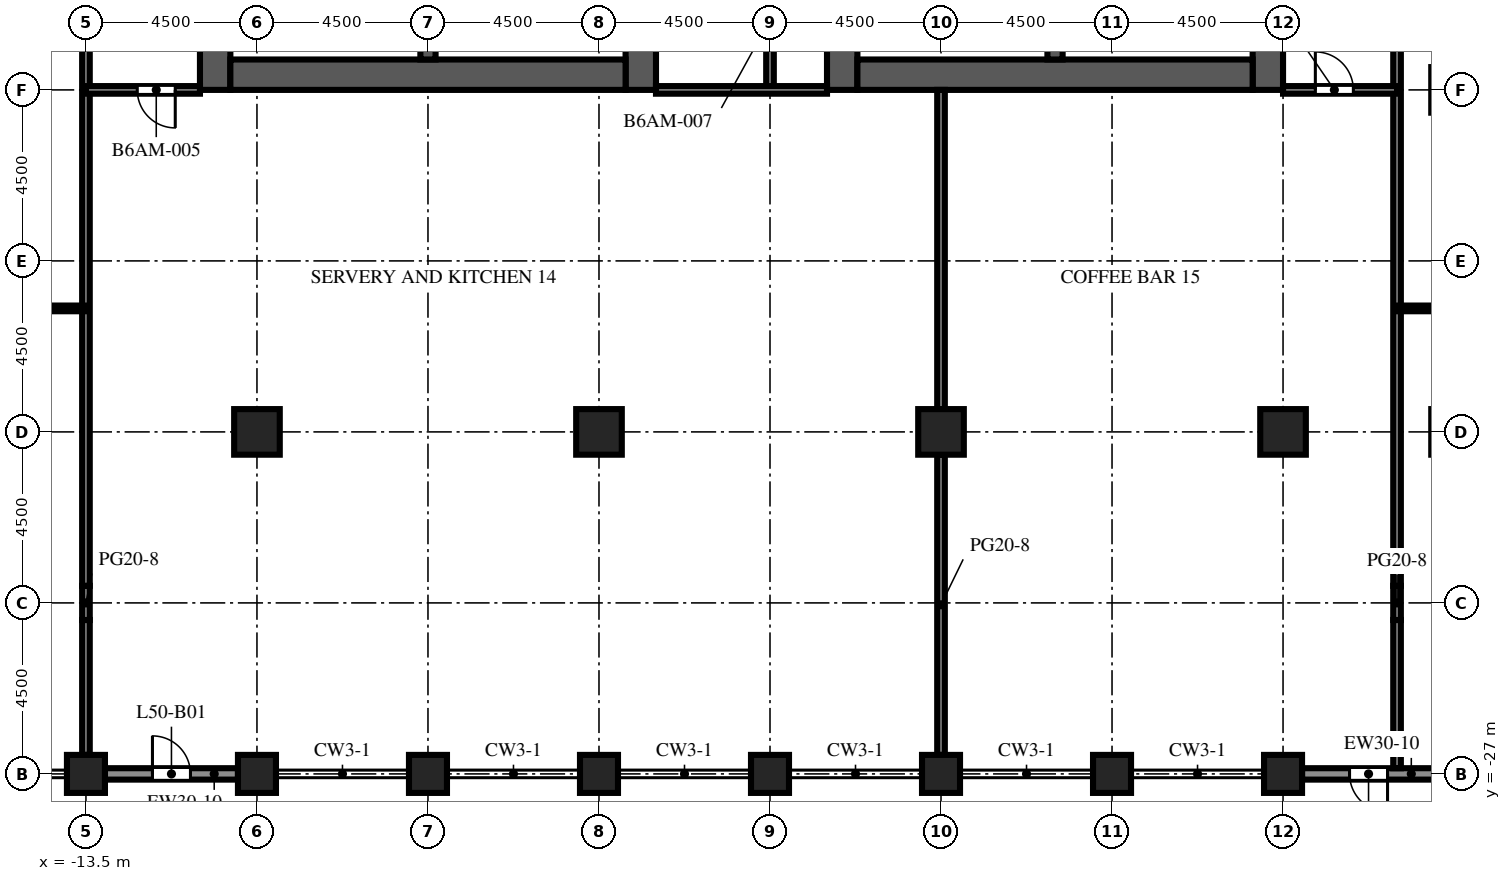
"""IFC4 building model, lengths in metres.
Left out: names, types, materials, properties, quantities, classifications, styles, units other than length and angle.
Written with IfcOpenShell. Run it as: python <this file> out.ifc"""

import sys

from ifc_helpers import new_model, si_unit, direction, frame, frame_2d, origin, origin_2d, place, context, subcontext, project, spatial, rectangle, extrude, element, fill, save


model = new_model("IFC4")
c1 = context("Model", 3, precision=1e-05, world=origin(), true_north=direction((0.0, 1.0)))
c2 = subcontext(c1, "Body", "Model", "MODEL_VIEW")
j1 = project(units=[si_unit("LENGTHUNIT", "METRE"), si_unit("PLANEANGLEUNIT", "RADIAN")], contexts=[c1])
p1 = place(None, origin())
s1 = spatial("IfcSite", under=j1, at=p1, CompositionType="ELEMENT")
p2 = place(p1, origin())
s2 = spatial("IfcBuilding", under=s1, at=p2, CompositionType="ELEMENT")
p3 = place(p2, frame((0.0, 0.0, 220.2)))
s3 = spatial("IfcBuildingStorey", under=s2, at=p3, CompositionType="ELEMENT", Elevation=220.2)
p4 = place(p3, frame((-13.5, -27.0, 0.0), z_axis=(0.0, 0.0, 1.0), x_axis=(1.0, 0.0, 0.0)))
e1 = element("IfcColumn", 1, at=p4, inside=s3, PredefinedType="COLUMN", context=c2, shape_type="SweptSolid", body=[
    extrude(rectangle(XDim=1.0, YDim=1.0, at=origin_2d()), origin(), (0.0, 0.0, 1.0), 6.0),
])
p5 = place(p3, frame((-9.0, -27.0, 0.0), z_axis=(0.0, 0.0, 1.0), x_axis=(1.0, 0.0, 0.0)))
e2 = element("IfcColumn", 2, at=p5, inside=s3, PredefinedType="COLUMN", context=c2, shape_type="SweptSolid", body=[
    extrude(rectangle(XDim=1.0, YDim=1.0, at=origin_2d()), origin(), (0.0, 0.0, 1.0), 3.6),
])
p6 = place(p3, frame((-4.5, -27.0, 0.0), z_axis=(0.0, 0.0, 1.0), x_axis=(1.0, 0.0, 0.0)))
e3 = element("IfcColumn", 3, at=p6, inside=s3, PredefinedType="COLUMN", context=c2, shape_type="SweptSolid", body=[
    extrude(rectangle(XDim=1.0, YDim=1.0, at=origin_2d()), origin(), (0.0, 0.0, 1.0), 6.0),
])
p7 = place(p3, frame((0.0, -27.0, 0.0), z_axis=(0.0, 0.0, 1.0), x_axis=(1.0, 0.0, 0.0)))
e4 = element("IfcColumn", 4, at=p7, inside=s3, PredefinedType="COLUMN", context=c2, shape_type="SweptSolid", body=[
    extrude(rectangle(XDim=1.0, YDim=1.0, at=origin_2d()), origin(), (0.0, 0.0, 1.0), 3.6),
])
p8 = place(p3, frame((4.5, -27.0, 0.0), z_axis=(0.0, 0.0, 1.0), x_axis=(1.0, 0.0, 0.0)))
e5 = element("IfcColumn", 5, at=p8, inside=s3, PredefinedType="COLUMN", context=c2, shape_type="SweptSolid", body=[
    extrude(rectangle(XDim=1.0, YDim=1.0, at=origin_2d()), origin(), (0.0, 0.0, 1.0), 6.0),
])
p9 = place(p3, frame((9.0, -27.0, 0.0), z_axis=(0.0, 0.0, 1.0), x_axis=(1.0, 0.0, 0.0)))
e6 = element("IfcColumn", 6, at=p9, inside=s3, PredefinedType="COLUMN", context=c2, shape_type="SweptSolid", body=[
    extrude(rectangle(XDim=1.0, YDim=1.0, at=origin_2d()), origin(), (0.0, 0.0, 1.0), 3.6),
])
p10 = place(p3, frame((13.5, -27.0, 0.0), z_axis=(0.0, 0.0, 1.0), x_axis=(1.0, 0.0, 0.0)))
e7 = element("IfcColumn", 7, at=p10, inside=s3, PredefinedType="COLUMN", context=c2, shape_type="SweptSolid", body=[
    extrude(rectangle(XDim=1.0, YDim=1.0, at=origin_2d()), origin(), (0.0, 0.0, 1.0), 6.0),
])
p11 = place(p3, frame((18.0, -27.0, 0.0), z_axis=(0.0, 0.0, 1.0), x_axis=(1.0, 0.0, 0.0)))
e8 = element("IfcColumn", 8, at=p11, inside=s3, PredefinedType="COLUMN", context=c2, shape_type="SweptSolid", body=[
    extrude(rectangle(XDim=1.0, YDim=1.0, at=origin_2d()), origin(), (0.0, 0.0, 1.0), 3.6),
])
for number, where, z_axis, x_axis in (
    (9, (-9.0, -18.0, 0.0), (0.0, 0.0, 1.0), (1.0, 0.0, 0.0)),
    (10, (0.0, -18.0, 0.0), (0.0, 0.0, 1.0), (1.0, 0.0, 0.0)),
    (11, (9.0, -18.0, 0.0), (0.0, 0.0, 1.0), (1.0, 0.0, 0.0)),
    (12, (18.0, -18.0, 0.0), (0.0, 0.0, 1.0), (1.0, 0.0, 0.0)),
):
    element("IfcColumn", number, at=place(p3, frame(where, z_axis=z_axis, x_axis=x_axis)), inside=s3, PredefinedType="COLUMN", context=c2, shape_type="SweptSolid", body=[
        extrude(rectangle(XDim=1.2, YDim=1.2, at=origin_2d()), origin(), (0.0, 0.0, 1.0), 5.4),
    ])
p12 = place(p3, frame((-10.1, -9.0, 0.0), z_axis=(0.0, 0.0, 1.0), x_axis=(0.0, 1.0, 0.0)))
e13 = element("IfcWall", 13, at=p12, inside=s3, PredefinedType="SHEAR", context=c2, shape_type="SweptSolid", body=[
    extrude(rectangle(XDim=27.5, YDim=0.8, at=frame_2d((13.75, 0.0))), origin(), (0.0, 0.0, 1.0), 6.0),
])
p13 = place(p12, frame((12.55, 0.0, 0.0)))
e14 = element("IfcOpeningElement", 14, at=p13, cuts=e13, PredefinedType="OPENING", context=c2, shape_type="SweptSolid", body=[
    extrude(rectangle(XDim=2.4, YDim=2.4, at=frame_2d((1.2, 1.2))), frame((0.0, 0.41, 0.0), z_axis=(0.0, -1.0, 0.0), x_axis=(1.0, 0.0, 0.0)), (0.0, 0.0, 1.0), 0.82),
])
p14 = place(p12, frame((6.825, 0.0, 0.0)))
e15 = element("IfcOpeningElement", 15, at=p14, cuts=e13, PredefinedType="OPENING", context=c2, shape_type="SweptSolid", body=[
    extrude(rectangle(XDim=1.2, YDim=2.1, at=frame_2d((0.6, 1.05))), frame((0.0, 0.41, 0.0), z_axis=(0.0, -1.0, 0.0), x_axis=(1.0, 0.0, 0.0)), (0.0, 0.0, 1.0), 0.82),
])
p15 = place(p12, frame((19.475, 0.0, 0.0)))
e16 = element("IfcOpeningElement", 16, at=p15, cuts=e13, PredefinedType="OPENING", context=c2, shape_type="SweptSolid", body=[
    extrude(rectangle(XDim=1.2, YDim=2.1, at=frame_2d((0.6, 1.05))), frame((0.0, 0.41, 0.0), z_axis=(0.0, -1.0, 0.0), x_axis=(1.0, 0.0, 0.0)), (0.0, 0.0, 1.0), 0.82),
])
p16 = place(p3, frame((1.1, -9.0, 0.0), z_axis=(0.0, 0.0, 1.0), x_axis=(0.0, 1.0, 0.0)))
e17 = element("IfcWall", 17, at=p16, inside=s3, PredefinedType="SHEAR", context=c2, shape_type="SweptSolid", body=[
    extrude(rectangle(XDim=27.5, YDim=0.8, at=frame_2d((13.75, 0.0))), origin(), (0.0, 0.0, 1.0), 6.0),
])
p17 = place(p16, frame((12.55, 0.0, 0.0)))
e18 = element("IfcOpeningElement", 18, at=p17, cuts=e17, PredefinedType="OPENING", context=c2, shape_type="SweptSolid", body=[
    extrude(rectangle(XDim=2.4, YDim=2.4, at=frame_2d((1.2, 1.2))), frame((0.0, 0.41, 0.0), z_axis=(0.0, -1.0, 0.0), x_axis=(1.0, 0.0, 0.0)), (0.0, 0.0, 1.0), 0.82),
])
p18 = place(p16, frame((5.5, 0.0, 0.0)))
e19 = element("IfcOpeningElement", 19, at=p18, cuts=e17, PredefinedType="OPENING", context=c2, shape_type="SweptSolid", body=[
    extrude(rectangle(XDim=0.95, YDim=2.1, at=frame_2d((0.475, 1.05))), frame((0.0, 0.41, 0.0), z_axis=(0.0, -1.0, 0.0), x_axis=(1.0, 0.0, 0.0)), (0.0, 0.0, 1.0), 0.82),
])
p19 = place(p16, frame((23.475, 0.0, 0.0)))
e20 = element("IfcOpeningElement", 20, at=p19, cuts=e17, PredefinedType="OPENING", context=c2, shape_type="SweptSolid", body=[
    extrude(rectangle(XDim=1.2, YDim=2.1, at=frame_2d((0.6, 1.05))), frame((0.0, 0.41, 0.0), z_axis=(0.0, -1.0, 0.0), x_axis=(1.0, 0.0, 0.0)), (0.0, 0.0, 1.0), 0.82),
])
p20 = place(p3, frame((-9.7, -8.6, 0.0), z_axis=(0.0, 0.0, 1.0), x_axis=(1.0, 0.0, 0.0)))
e21 = element("IfcWall", 21, at=p20, inside=s3, PredefinedType="SHEAR", context=c2, shape_type="SweptSolid", body=[
    extrude(rectangle(XDim=10.4, YDim=0.8, at=frame_2d((5.2, 0.0))), origin(), (0.0, 0.0, 1.0), 6.0),
])
p21 = place(p3, frame((-4.5, -8.2, 0.0), z_axis=(0.0, 0.0, 1.0), x_axis=(0.0, 1.0, 0.0)))
e22 = element("IfcWall", 22, at=p21, inside=s3, PredefinedType="SHEAR", context=c2, shape_type="SweptSolid", body=[
    extrude(rectangle(XDim=7.5, YDim=0.4, at=frame_2d((3.75, 0.0))), origin(), (0.0, 0.0, 1.0), 6.0),
])
p22 = place(p3, frame((6.4, -9.0, 0.0), z_axis=(0.0, 0.0, 1.0), x_axis=(0.0, 1.0, 0.0)))
e23 = element("IfcWall", 23, at=p22, inside=s3, PredefinedType="SHEAR", context=c2, shape_type="SweptSolid", body=[
    extrude(rectangle(XDim=27.5, YDim=0.8, at=frame_2d((13.75, 0.0))), origin(), (0.0, 0.0, 1.0), 6.0),
])
p23 = place(p22, frame((12.55, 0.0, 0.0)))
e24 = element("IfcOpeningElement", 24, at=p23, cuts=e23, PredefinedType="OPENING", context=c2, shape_type="SweptSolid", body=[
    extrude(rectangle(XDim=2.4, YDim=2.4, at=frame_2d((1.2, 1.2))), frame((0.0, 0.41, 0.0), z_axis=(0.0, -1.0, 0.0), x_axis=(1.0, 0.0, 0.0)), (0.0, 0.0, 1.0), 0.82),
])
p24 = place(p22, frame((5.5, 0.0, 0.0)))
e25 = element("IfcOpeningElement", 25, at=p24, cuts=e23, PredefinedType="OPENING", context=c2, shape_type="SweptSolid", body=[
    extrude(rectangle(XDim=0.95, YDim=2.1, at=frame_2d((0.475, 1.05))), frame((0.0, 0.41, 0.0), z_axis=(0.0, -1.0, 0.0), x_axis=(1.0, 0.0, 0.0)), (0.0, 0.0, 1.0), 0.82),
])
p25 = place(p22, frame((23.475, 0.0, 0.0)))
e26 = element("IfcOpeningElement", 26, at=p25, cuts=e23, PredefinedType="OPENING", context=c2, shape_type="SweptSolid", body=[
    extrude(rectangle(XDim=1.2, YDim=2.1, at=frame_2d((0.6, 1.05))), frame((0.0, 0.41, 0.0), z_axis=(0.0, -1.0, 0.0), x_axis=(1.0, 0.0, 0.0)), (0.0, 0.0, 1.0), 0.82),
])
p26 = place(p3, frame((17.6, -9.0, 0.0), z_axis=(0.0, 0.0, 1.0), x_axis=(0.0, 1.0, 0.0)))
e27 = element("IfcWall", 27, at=p26, inside=s3, PredefinedType="SHEAR", context=c2, shape_type="SweptSolid", body=[
    extrude(rectangle(XDim=27.5, YDim=0.8, at=frame_2d((13.75, 0.0))), origin(), (0.0, 0.0, 1.0), 6.0),
])
p27 = place(p26, frame((12.55, 0.0, 0.0)))
e28 = element("IfcOpeningElement", 28, at=p27, cuts=e27, PredefinedType="OPENING", context=c2, shape_type="SweptSolid", body=[
    extrude(rectangle(XDim=2.4, YDim=2.4, at=frame_2d((1.2, 1.2))), frame((0.0, 0.41, 0.0), z_axis=(0.0, -1.0, 0.0), x_axis=(1.0, 0.0, 0.0)), (0.0, 0.0, 1.0), 0.82),
])
p28 = place(p26, frame((6.825, 0.0, 0.0)))
e29 = element("IfcOpeningElement", 29, at=p28, cuts=e27, PredefinedType="OPENING", context=c2, shape_type="SweptSolid", body=[
    extrude(rectangle(XDim=1.2, YDim=2.1, at=frame_2d((0.6, 1.05))), frame((0.0, 0.41, 0.0), z_axis=(0.0, -1.0, 0.0), x_axis=(1.0, 0.0, 0.0)), (0.0, 0.0, 1.0), 0.82),
])
p29 = place(p26, frame((19.475, 0.0, 0.0)))
e30 = element("IfcOpeningElement", 30, at=p29, cuts=e27, PredefinedType="OPENING", context=c2, shape_type="SweptSolid", body=[
    extrude(rectangle(XDim=1.2, YDim=2.1, at=frame_2d((0.6, 1.05))), frame((0.0, 0.41, 0.0), z_axis=(0.0, -1.0, 0.0), x_axis=(1.0, 0.0, 0.0)), (0.0, 0.0, 1.0), 0.82),
])
p30 = place(p3, frame((6.8, -8.6, 0.0), z_axis=(0.0, 0.0, 1.0), x_axis=(1.0, 0.0, 0.0)))
e31 = element("IfcWall", 31, at=p30, inside=s3, PredefinedType="SHEAR", context=c2, shape_type="SweptSolid", body=[
    extrude(rectangle(XDim=10.4, YDim=0.8, at=frame_2d((5.2, 0.0))), origin(), (0.0, 0.0, 1.0), 6.0),
])
p31 = place(p3, frame((12.0, -8.2, 0.0), z_axis=(0.0, 0.0, 1.0), x_axis=(0.0, 1.0, 0.0)))
e32 = element("IfcWall", 32, at=p31, inside=s3, PredefinedType="SHEAR", context=c2, shape_type="SweptSolid", body=[
    extrude(rectangle(XDim=7.5, YDim=0.4, at=frame_2d((3.75, 0.0))), origin(), (0.0, 0.0, 1.0), 6.0),
])
p32 = place(p3, frame((-9.5, -27.0, 0.0), z_axis=(0.0, 0.0, 1.0), x_axis=(-1.0, 0.0, 0.0)))
e33 = element("IfcWall", 33, at=p32, inside=s3, PredefinedType="SOLIDWALL", context=c2, shape_type="SweptSolid", body=[
    extrude(rectangle(XDim=3.5, YDim=0.3, at=frame_2d((1.75, 0.0))), origin(), (0.0, 0.0, 1.0), 4.6),
])
p33 = place(p32, frame((1.25, 0.0, 0.0)))
e34 = element("IfcOpeningElement", 34, at=p33, cuts=e33, PredefinedType="OPENING", context=c2, shape_type="SweptSolid", body=[
    extrude(rectangle(XDim=1.0, YDim=2.2, at=frame_2d((0.5, 1.1))), frame((0.0, 0.16, 0.0), z_axis=(0.0, -1.0, 0.0), x_axis=(1.0, 0.0, 0.0)), (0.0, 0.0, 1.0), 0.32),
])
p34 = place(p3, frame((22.0, -27.0, 0.0), z_axis=(0.0, 0.0, 1.0), x_axis=(-1.0, 0.0, 0.0)))
e35 = element("IfcWall", 35, at=p34, inside=s3, PredefinedType="SOLIDWALL", context=c2, shape_type="SweptSolid", body=[
    extrude(rectangle(XDim=3.5, YDim=0.3, at=frame_2d((1.75, 0.0))), origin(), (0.0, 0.0, 1.0), 4.6),
])
p35 = place(p34, frame((1.25, 0.0, 0.0)))
e36 = element("IfcOpeningElement", 36, at=p35, cuts=e35, PredefinedType="OPENING", context=c2, shape_type="SweptSolid", body=[
    extrude(rectangle(XDim=1.0, YDim=2.2, at=frame_2d((0.5, 1.1))), frame((0.0, 0.16, 0.0), z_axis=(0.0, -1.0, 0.0), x_axis=(1.0, 0.0, 0.0)), (0.0, 0.0, 1.0), 0.32),
])
for number, where, z_axis, x_axis in (
    (37, (-1.8, -8.2, 0.0), (0.0, 0.0, 1.0), (0.0, 1.0, 0.0)),
    (38, (9.3, -8.2, 0.0), (0.0, 0.0, 1.0), (0.0, 1.0, 0.0)),
):
    element("IfcWall", number, at=place(p3, frame(where, z_axis=z_axis, x_axis=x_axis)), inside=s3, PredefinedType="PARTITIONING", context=c2, shape_type="SweptSolid", body=[
        extrude(rectangle(XDim=4.5, YDim=0.1, at=frame_2d((2.25, 0.0))), origin(), (0.0, 0.0, 1.0), 5.4),
    ])
p36 = place(p3, frame((-13.5, -26.5, 0.0), z_axis=(0.0, 0.0, 1.0), x_axis=(0.0, 1.0, 0.0)))
e39 = element("IfcWall", 39, at=p36, inside=s3, PredefinedType="PARTITIONING", context=c2, shape_type="SweptSolid", body=[
    extrude(rectangle(XDim=3.55, YDim=0.2, at=frame_2d((1.775, 0.0))), origin(), (0.0, 0.0, 1.0), 5.4),
])
p37 = place(p3, frame((-13.5, -22.95, 0.0), z_axis=(0.0, 0.0, 1.0), x_axis=(0.0, 1.0, 0.0)))
e40 = element("IfcWall", 40, at=p37, inside=s3, PredefinedType="PARTITIONING", context=c2, shape_type="SweptSolid", body=[
    extrude(rectangle(XDim=0.9, YDim=0.2, at=frame_2d((0.45, 0.0))), origin(), (0.0, 0.0, 1.0), 3.57),
])
p38 = place(p3, frame((-13.5, -22.05, 0.0), z_axis=(0.0, 0.0, 1.0), x_axis=(0.0, 1.0, 0.0)))
e41 = element("IfcWall", 41, at=p38, inside=s3, PredefinedType="PARTITIONING", context=c2, shape_type="SweptSolid", body=[
    extrude(rectangle(XDim=25.3, YDim=0.2, at=frame_2d((12.65, 0.0))), origin(), (0.0, 0.0, 1.0), 5.4),
])
p39 = place(p38, frame((19.65, 0.0, 0.0)))
e42 = element("IfcOpeningElement", 42, at=p39, cuts=e41, PredefinedType="OPENING", context=c2, shape_type="SweptSolid", body=[
    extrude(rectangle(XDim=1.0, YDim=2.1, at=frame_2d((0.5, 1.05))), frame((0.0, 0.11, 0.0), z_axis=(0.0, -1.0, 0.0), x_axis=(1.0, 0.0, 0.0)), (0.0, 0.0, 1.0), 0.22),
])
p40 = place(p3, frame((4.5, -4.5, 0.0), z_axis=(0.0, 0.0, 1.0), x_axis=(0.0, -1.0, 0.0)))
e43 = element("IfcWall", 43, at=p40, inside=s3, PredefinedType="PARTITIONING", context=c2, shape_type="SweptSolid", body=[
    extrude(rectangle(XDim=4.5, YDim=0.2, at=frame_2d((2.25, 0.0))), origin(), (0.0, 0.0, 1.0), 5.4),
])
p41 = place(p40, frame((2.15, 0.0, 0.0)))
e44 = element("IfcOpeningElement", 44, at=p41, cuts=e43, PredefinedType="OPENING", context=c2, shape_type="SweptSolid", body=[
    extrude(rectangle(XDim=1.0, YDim=2.1, at=frame_2d((0.5, 1.05))), frame((0.0, 0.11, 0.0), z_axis=(0.0, -1.0, 0.0), x_axis=(1.0, 0.0, 0.0)), (0.0, 0.0, 1.0), 0.22),
])
p42 = place(p3, frame((9.0, -26.5, 0.0), z_axis=(0.0, 0.0, 1.0), x_axis=(0.0, 1.0, 0.0)))
e45 = element("IfcWall", 45, at=p42, inside=s3, PredefinedType="PARTITIONING", context=c2, shape_type="SweptSolid", body=[
    extrude(rectangle(XDim=7.9, YDim=0.2, at=frame_2d((3.95, 0.0))), origin(), (0.0, 0.0, 1.0), 3.57),
])
p43 = place(p3, frame((9.0, -17.4, 0.0), z_axis=(0.0, 0.0, 1.0), x_axis=(0.0, 1.0, 0.0)))
e46 = element("IfcWall", 46, at=p43, inside=s3, PredefinedType="PARTITIONING", context=c2, shape_type="SweptSolid", body=[
    extrude(rectangle(XDim=8.4, YDim=0.2, at=frame_2d((4.2, 0.0))), origin(), (0.0, 0.0, 1.0), 5.4),
])
p44 = place(p3, frame((21.0, -26.85, 0.0), z_axis=(0.0, 0.0, 1.0), x_axis=(0.0, 1.0, 0.0)))
e47 = element("IfcWall", 47, at=p44, inside=s3, PredefinedType="PARTITIONING", context=c2, shape_type="SweptSolid", body=[
    extrude(rectangle(XDim=3.9, YDim=0.2, at=frame_2d((1.95, 0.0))), origin(), (0.0, 0.0, 1.0), 5.4),
])
p45 = place(p3, frame((21.0, -22.95, 0.0), z_axis=(0.0, 0.0, 1.0), x_axis=(0.0, 1.0, 0.0)))
e48 = element("IfcWall", 48, at=p45, inside=s3, PredefinedType="PARTITIONING", context=c2, shape_type="SweptSolid", body=[
    extrude(rectangle(XDim=0.9, YDim=0.2, at=frame_2d((0.45, 0.0))), origin(), (0.0, 0.0, 1.0), 3.57),
])
p46 = place(p3, frame((21.0, 3.25, 0.0), z_axis=(0.0, 0.0, 1.0), x_axis=(0.0, -1.0, 0.0)))
e49 = element("IfcWall", 49, at=p46, inside=s3, PredefinedType="PARTITIONING", context=c2, shape_type="SweptSolid", body=[
    extrude(rectangle(XDim=25.3, YDim=0.2, at=frame_2d((12.65, 0.0))), origin(), (0.0, 0.0, 1.0), 5.4),
])
p47 = place(p46, frame((7.15, 0.0, 0.0)))
e50 = element("IfcOpeningElement", 50, at=p47, cuts=e49, PredefinedType="OPENING", context=c2, shape_type="SweptSolid", body=[
    extrude(rectangle(XDim=1.0, YDim=2.1, at=frame_2d((0.5, 1.05))), frame((0.0, 0.11, 0.0), z_axis=(0.0, -1.0, 0.0), x_axis=(1.0, 0.0, 0.0)), (0.0, 0.0, 1.0), 0.22),
])
p48 = place(p3, frame((-17.55, -14.75, 0.0), z_axis=(0.0, 0.0, 1.0), x_axis=(1.0, 0.0, 0.0)))
e51 = element("IfcWall", 51, at=p48, inside=s3, PredefinedType="PARTITIONING", context=c2, shape_type="SweptSolid", body=[
    extrude(rectangle(XDim=4.05, YDim=0.15, at=frame_2d((2.025, 0.0))), origin(), (0.0, 0.0, 1.0), 5.4),
])
p49 = place(p3, frame((21.0, -14.75, 0.0), z_axis=(0.0, 0.0, 1.0), x_axis=(1.0, 0.0, 0.0)))
e52 = element("IfcWall", 52, at=p49, inside=s3, PredefinedType="PARTITIONING", context=c2, shape_type="SweptSolid", body=[
    extrude(rectangle(XDim=5.55, YDim=0.15, at=frame_2d((2.775, 0.0))), origin(), (0.0, 0.0, 1.0), 5.4),
])
p50 = place(p3, frame((-10.5, -9.0, 0.0), z_axis=(0.0, 0.0, 1.0), x_axis=(-1.0, 0.0, 0.0)))
e53 = element("IfcWall", 53, at=p50, inside=s3, PredefinedType="PARTITIONING", context=c2, shape_type="SweptSolid", body=[
    extrude(rectangle(XDim=3.0, YDim=0.2, at=frame_2d((1.5, 0.0))), origin(), (0.0, 0.0, 1.0), 5.4),
])
p51 = place(p50, frame((0.65, 0.0, 0.0)))
e54 = element("IfcOpeningElement", 54, at=p51, cuts=e53, PredefinedType="OPENING", context=c2, shape_type="SweptSolid", body=[
    extrude(rectangle(XDim=1.0, YDim=2.1, at=frame_2d((0.5, 1.05))), frame((0.0, 0.11, 0.0), z_axis=(0.0, -1.0, 0.0), x_axis=(1.0, 0.0, 0.0)), (0.0, 0.0, 1.0), 0.22),
])
p52 = place(p3, frame((1.5, -9.0, 0.0), z_axis=(0.0, 0.0, 1.0), x_axis=(1.0, 0.0, 0.0)))
e55 = element("IfcWall", 55, at=p52, inside=s3, PredefinedType="PARTITIONING", context=c2, shape_type="SweptSolid", body=[
    extrude(rectangle(XDim=4.5, YDim=0.2, at=frame_2d((2.25, 0.0))), origin(), (0.0, 0.0, 1.0), 5.4),
])
p53 = place(p3, frame((21.0, -9.0, 0.0), z_axis=(0.0, 0.0, 1.0), x_axis=(-1.0, 0.0, 0.0)))
e56 = element("IfcWall", 56, at=p53, inside=s3, PredefinedType="PARTITIONING", context=c2, shape_type="SweptSolid", body=[
    extrude(rectangle(XDim=3.0, YDim=0.2, at=frame_2d((1.5, 0.0))), origin(), (0.0, 0.0, 1.0), 5.4),
])
p54 = place(p53, frame((1.15, 0.0, 0.0)))
e57 = element("IfcOpeningElement", 57, at=p54, cuts=e56, PredefinedType="OPENING", context=c2, shape_type="SweptSolid", body=[
    extrude(rectangle(XDim=1.0, YDim=2.1, at=frame_2d((0.5, 1.05))), frame((0.0, 0.11, 0.0), z_axis=(0.0, -1.0, 0.0), x_axis=(1.0, 0.0, 0.0)), (0.0, 0.0, 1.0), 0.22),
])
p55 = place(p33, origin())
e58 = element("IfcDoor", 58, at=p55, inside=s3, OperationType="SINGLE_SWING_RIGHT", PredefinedType="DOOR", context=c2, shape_type="SweptSolid", body=[
    extrude(rectangle(XDim=1.0, YDim=2.2, at=frame_2d((0.5, 1.1))), frame((0.0, 0.025, 0.0), z_axis=(0.0, -1.0, 0.0), x_axis=(1.0, 0.0, 0.0)), (0.0, 0.0, 1.0), 0.05),
])
fill(e34, e58)
p56 = place(p35, origin())
e59 = element("IfcDoor", 59, at=p56, inside=s3, OperationType="SINGLE_SWING_LEFT", PredefinedType="DOOR", context=c2, shape_type="SweptSolid", body=[
    extrude(rectangle(XDim=1.0, YDim=2.2, at=frame_2d((0.5, 1.1))), frame((0.0, 0.025, 0.0), z_axis=(0.0, -1.0, 0.0), x_axis=(1.0, 0.0, 0.0)), (0.0, 0.0, 1.0), 0.05),
])
fill(e36, e59)
p57 = place(p51, origin())
e60 = element("IfcDoor", 60, at=p57, inside=s3, OperationType="SINGLE_SWING_LEFT", PredefinedType="DOOR", context=c2, shape_type="SweptSolid", body=[
    extrude(rectangle(XDim=1.0, YDim=2.1, at=frame_2d((0.5, 1.05))), frame((0.0, 0.025, 0.0), z_axis=(0.0, -1.0, 0.0), x_axis=(1.0, 0.0, 0.0)), (0.0, 0.0, 1.0), 0.05),
])
fill(e54, e60)
p58 = place(p54, origin())
e61 = element("IfcDoor", 61, at=p58, inside=s3, OperationType="SINGLE_SWING_RIGHT", PredefinedType="DOOR", context=c2, shape_type="SweptSolid", body=[
    extrude(rectangle(XDim=1.0, YDim=2.1, at=frame_2d((0.5, 1.05))), frame((0.0, 0.025, 0.0), z_axis=(0.0, -1.0, 0.0), x_axis=(1.0, 0.0, 0.0)), (0.0, 0.0, 1.0), 0.05),
])
fill(e57, e61)
save(model, sys.argv[1])
